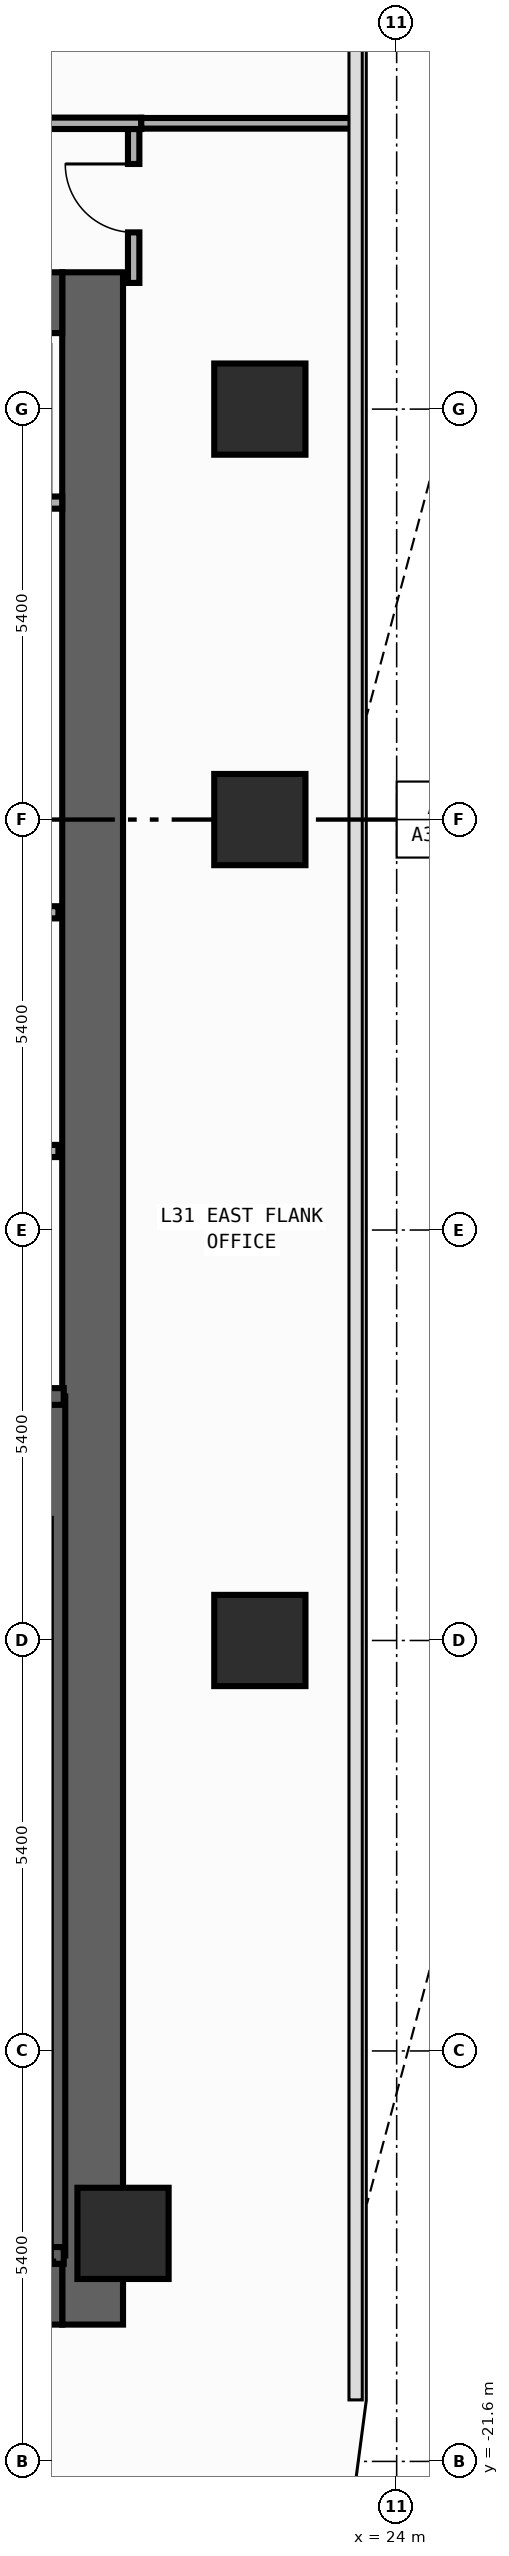
"""IFC4 building model, lengths in metres.
Left out: names, types, materials, properties, quantities, classifications, styles, units other than length and angle.
Written with IfcOpenShell. Run it as: python <this file> out.ifc"""

import sys

from ifc_helpers import new_model, si_unit, direction, frame, frame_2d, origin, origin_2d, place, context, subcontext, project, spatial, rectangle, extrude, element, fill, save


model = new_model("IFC4")
c1 = context("Model", 3, precision=1e-05, world=origin(), true_north=direction((0.0, 1.0)))
c2 = subcontext(c1, "Body", "Model", "MODEL_VIEW")
j1 = project(units=[si_unit("LENGTHUNIT", "METRE"), si_unit("PLANEANGLEUNIT", "RADIAN")], contexts=[c1])
p1 = place(None, origin())
s1 = spatial("IfcSite", under=j1, at=p1, CompositionType="ELEMENT")
p2 = place(p1, origin())
s2 = spatial("IfcBuilding", under=s1, at=p2, CompositionType="ELEMENT")
p3 = place(p2, frame((0.0, 0.0, 135.2)))
s3 = spatial("IfcBuildingStorey", under=s2, at=p3, CompositionType="ELEMENT", Elevation=135.2)
p4 = place(p3, frame((20.0, -19.8, 0.0), z_axis=(0.0, 0.0, 1.0), x_axis=(0.0, 1.0, 0.0)))
e1 = element("IfcWall", 1, at=p4, inside=s3, PredefinedType="SHEAR", context=c2, shape_type="SweptSolid", body=[
    extrude(rectangle(XDim=27.0, YDim=0.8, at=frame_2d((13.5, 0.0))), origin(), (0.0, 0.0, 1.0), 3.94),
])
for number, where, z_axis, x_axis in (
    (2, (12.8, -19.4, 0.0), (0.0, 0.0, 1.0), (1.0, 0.0, 0.0)),
    (3, (12.8, 6.8, 0.0), (0.0, 0.0, 1.0), (1.0, 0.0, 0.0)),
):
    element("IfcWall", number, at=place(p3, frame(where, z_axis=z_axis, x_axis=x_axis)), inside=s3, PredefinedType="SHEAR", context=c2, shape_type="SweptSolid", body=[
        extrude(rectangle(XDim=6.8, YDim=0.8, at=frame_2d((3.4, 0.0))), origin(), (0.0, 0.0, 1.0), 3.94),
    ])
p5 = place(p3, frame((19.53, -18.89, 0.0), z_axis=(0.0, 0.0, 1.0), x_axis=(0.0, 1.0, 0.0)))
e4 = element("IfcWall", 4, at=p5, inside=s3, PredefinedType="SHEAR", context=c2, shape_type="SweptSolid", body=[
    extrude(rectangle(XDim=11.3, YDim=0.22, at=frame_2d((5.65, 0.0))), origin(), (0.0, 0.0, 1.0), 3.94),
])
p6 = place(p3, frame((15.705, -18.89, 0.0), z_axis=(0.0, 0.0, 1.0), x_axis=(1.0, 0.0, 0.0)))
e5 = element("IfcWall", 5, at=p6, inside=s3, PredefinedType="SHEAR", context=c2, shape_type="SweptSolid", body=[
    extrude(rectangle(XDim=3.915, YDim=0.22, at=frame_2d((1.958, 0.0))), origin(), (0.0, 0.0, 1.0), 3.94),
])
p7 = place(p3, frame((19.62, -7.59, 0.0), z_axis=(0.0, 0.0, 1.0), x_axis=(-1.0, 0.0, 0.0)))
e6 = element("IfcWall", 6, at=p7, inside=s3, PredefinedType="SHEAR", context=c2, shape_type="SweptSolid", body=[
    extrude(rectangle(XDim=3.915, YDim=0.22, at=frame_2d((1.958, 0.0))), origin(), (0.0, 0.0, 1.0), 3.94),
])
p8 = place(p7, frame((1.08, 0.0, 0.0)))
e7 = element("IfcOpeningElement", 7, at=p8, cuts=e6, PredefinedType="OPENING", context=c2, shape_type="SweptSolid", body=[
    extrude(rectangle(XDim=1.1, YDim=2.2, at=frame_2d((0.55, 1.1))), frame((0.0, 0.12, 0.0), z_axis=(0.0, -1.0, 0.0), x_axis=(1.0, 0.0, 0.0)), (0.0, 0.0, 1.0), 0.24),
])
for number, where, z_axis, x_axis in (
    (8, (20.4, -18.6, 0.0), (0.0, 0.0, 1.0), (1.0, 0.0, 0.0)),
    (9, (22.2, -10.8, 0.0), (0.0, 0.0, 1.0), (1.0, 0.0, 0.0)),
    (10, (22.2, 0.0, 0.0), (0.0, 0.0, 1.0), (1.0, 0.0, 0.0)),
    (11, (22.2, 5.4, 0.0), (0.0, 0.0, 1.0), (1.0, 0.0, 0.0)),
):
    element("IfcColumn", number, at=place(p3, frame(where, z_axis=z_axis, x_axis=x_axis)), inside=s3, PredefinedType="COLUMN", context=c2, shape_type="SweptSolid", body=[
        extrude(rectangle(XDim=1.2, YDim=1.2, at=origin_2d()), origin(), (0.0, 0.0, 1.0), 4.2),
    ])
p9 = place(p3, frame((15.75, -4.36, 0.0), z_axis=(0.0, 0.0, 1.0), x_axis=(1.0, 0.0, 0.0)))
e12 = element("IfcWall", 12, at=p9, inside=s3, PredefinedType="STANDARD", context=c2, shape_type="SweptSolid", body=[
    extrude(rectangle(XDim=3.8, YDim=0.16, at=frame_2d((1.9, 0.0))), origin(), (0.0, 0.0, 1.0), 3.94),
])
p10 = place(p9, frame((1.47, 0.0, 0.0)))
e13 = element("IfcOpeningElement", 13, at=p10, cuts=e12, PredefinedType="OPENING", context=c2, shape_type="SweptSolid", body=[
    extrude(rectangle(XDim=1.15, YDim=2.2, at=frame_2d((0.575, 1.1))), frame((0.0, 0.09, 0.0), z_axis=(0.0, -1.0, 0.0), x_axis=(1.0, 0.0, 0.0)), (0.0, 0.0, 1.0), 0.18),
])
p11 = place(p3, frame((15.75, -1.22, 0.0), z_axis=(0.0, 0.0, 1.0), x_axis=(1.0, 0.0, 0.0)))
e14 = element("IfcWall", 14, at=p11, inside=s3, PredefinedType="STANDARD", context=c2, shape_type="SweptSolid", body=[
    extrude(rectangle(XDim=3.8, YDim=0.16, at=frame_2d((1.9, 0.0))), origin(), (0.0, 0.0, 1.0), 3.94),
])
p12 = place(p3, frame((17.31, 4.17, 0.0), z_axis=(0.0, 0.0, 1.0), x_axis=(1.0, 0.0, 0.0)))
e15 = element("IfcWall", 15, at=p12, inside=s3, PredefinedType="PARTITIONING", context=c2, shape_type="SweptSolid", body=[
    extrude(rectangle(XDim=2.29, YDim=0.16, at=frame_2d((1.145, 0.0))), origin(), (0.0, 0.0, 1.0), 3.94),
])
p13 = place(p3, frame((20.54, 7.06, 0.0), z_axis=(0.0, 0.0, 1.0), x_axis=(0.0, 1.0, 0.0)))
e16 = element("IfcWall", 16, at=p13, inside=s3, PredefinedType="PARTITIONING", context=c2, shape_type="SweptSolid", body=[
    extrude(rectangle(XDim=2.025, YDim=0.15, at=frame_2d((1.012, 0.0))), origin(), (0.0, 0.0, 1.0), 3.94),
])
p14 = place(p13, frame((0.665, 0.0, 0.0)))
e17 = element("IfcOpeningElement", 17, at=p14, cuts=e16, PredefinedType="OPENING", context=c2, shape_type="SweptSolid", body=[
    extrude(rectangle(XDim=0.9, YDim=2.15, at=frame_2d((0.45, 1.075))), frame((0.0, 0.085, 0.0), z_axis=(0.0, -1.0, 0.0), x_axis=(1.0, 0.0, 0.0)), (0.0, 0.0, 1.0), 0.17),
])
p15 = place(p3, frame((11.81, 9.16, 0.0), z_axis=(0.0, 0.0, 1.0), x_axis=(1.0, 0.0, 0.0)))
e18 = element("IfcWall", 18, at=p15, inside=s3, PredefinedType="PARTITIONING", context=c2, shape_type="SweptSolid", body=[
    extrude(rectangle(XDim=8.83, YDim=0.15, at=frame_2d((4.415, 0.0))), origin(), (0.0, 0.0, 1.0), 3.94),
])
p16 = place(p15, frame((5.067, 0.0, 0.0)))
e19 = element("IfcOpeningElement", 19, at=p16, cuts=e18, PredefinedType="OPENING", context=c2, shape_type="SweptSolid", body=[
    extrude(rectangle(XDim=0.9, YDim=2.15, at=frame_2d((0.45, 1.075))), frame((0.0, 0.085, 0.0), z_axis=(0.0, -1.0, 0.0), x_axis=(1.0, 0.0, 0.0)), (0.0, 0.0, 1.0), 0.17),
])
p17 = place(p3, frame((20.64, 9.16, 0.0), z_axis=(0.0, 0.0, 1.0), x_axis=(1.0, 0.0, 0.0)))
e20 = element("IfcWall", 20, at=p17, inside=s3, PredefinedType="PARTITIONING", context=c2, shape_type="SweptSolid", body=[
    extrude(rectangle(XDim=2.815, YDim=0.14, at=frame_2d((1.408, 0.0))), origin(), (0.0, 0.0, 1.0), 3.94),
])
p18 = place(p14, origin())
e21 = element("IfcDoor", 21, at=p18, inside=s3, OperationType="SINGLE_SWING_RIGHT", PredefinedType="DOOR", context=c2, shape_type="SweptSolid", body=[
    extrude(rectangle(XDim=0.9, YDim=2.15, at=frame_2d((0.45, 1.075))), frame((0.0, 0.025, 0.0), z_axis=(0.0, -1.0, 0.0), x_axis=(1.0, 0.0, 0.0)), (0.0, 0.0, 1.0), 0.05),
])
fill(e17, e21)
save(model, sys.argv[1])
